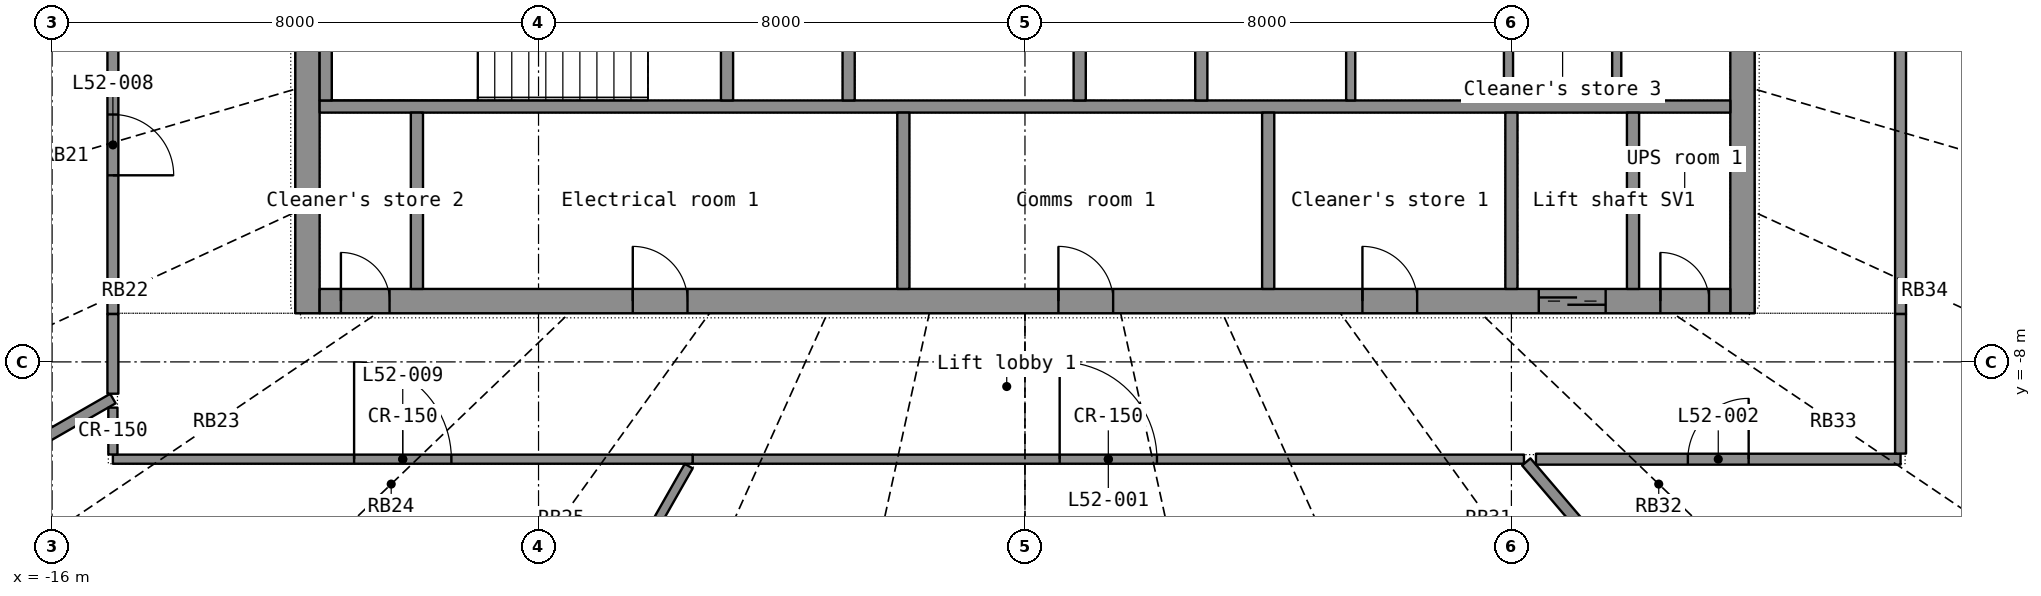
"""IFC4 building model, lengths in metres.
Left out: names, types, materials, properties, quantities, classifications, styles, units other than length and angle.
Written with IfcOpenShell. Run it as: python <this file> out.ifc"""

import sys

from ifc_helpers import new_model, si_unit, direction, frame, frame_2d, origin, place, context, subcontext, project, spatial, rectangle, extrude, element, fill, save


model = new_model("IFC4")
c1 = context("Model", 3, precision=1e-05, world=origin(), true_north=direction((0.0, 1.0)))
c2 = subcontext(c1, "Body", "Model", "MODEL_VIEW")
j1 = project(units=[si_unit("LENGTHUNIT", "METRE"), si_unit("PLANEANGLEUNIT", "RADIAN")], contexts=[c1])
p1 = place(None, origin())
s1 = spatial("IfcSite", under=j1, at=p1, CompositionType="ELEMENT")
p2 = place(p1, origin())
s2 = spatial("IfcBuilding", under=s1, at=p2, CompositionType="ELEMENT")
p3 = place(p2, frame((0.0, 0.0, 217.1)))
s3 = spatial("IfcBuildingStorey", under=s2, at=p3, CompositionType="ELEMENT", Elevation=217.1)
p4 = place(p3, frame((-11.8, -7.2, 0.0), z_axis=(0.0, 0.0, 1.0), x_axis=(0.0, 1.0, 0.0)))
e1 = element("IfcWall", 1, at=p4, inside=s3, PredefinedType="SHEAR", context=c2, shape_type="SweptSolid", body=[
    extrude(rectangle(XDim=14.4, YDim=0.4, at=frame_2d((7.2, 0.0))), origin(), (0.0, 0.0, 1.0), 3.3),
])
p5 = place(p4, frame((6.5, 0.0, 0.0)))
e2 = element("IfcOpeningElement", 2, at=p5, cuts=e1, PredefinedType="OPENING", context=c2, shape_type="SweptSolid", body=[
    extrude(rectangle(XDim=1.4, YDim=2.2, at=frame_2d((0.7, 1.1))), frame((0.0, 0.21, 0.0), z_axis=(0.0, -1.0, 0.0), x_axis=(1.0, 0.0, 0.0)), (0.0, 0.0, 1.0), 0.42),
])
p6 = place(p3, frame((11.8, -7.2, 0.0), z_axis=(0.0, 0.0, 1.0), x_axis=(0.0, 1.0, 0.0)))
e3 = element("IfcWall", 3, at=p6, inside=s3, PredefinedType="SHEAR", context=c2, shape_type="SweptSolid", body=[
    extrude(rectangle(XDim=14.4, YDim=0.4, at=frame_2d((7.2, 0.0))), origin(), (0.0, 0.0, 1.0), 3.3),
])
p7 = place(p6, frame((6.5, 0.0, 0.0)))
e4 = element("IfcOpeningElement", 4, at=p7, cuts=e3, PredefinedType="OPENING", context=c2, shape_type="SweptSolid", body=[
    extrude(rectangle(XDim=1.4, YDim=2.2, at=frame_2d((0.7, 1.1))), frame((0.0, 0.21, 0.0), z_axis=(0.0, -1.0, 0.0), x_axis=(1.0, 0.0, 0.0)), (0.0, 0.0, 1.0), 0.42),
])
p8 = place(p3, frame((-11.6, -7.0, 0.0), z_axis=(0.0, 0.0, 1.0), x_axis=(1.0, 0.0, 0.0)))
e5 = element("IfcWall", 5, at=p8, inside=s3, PredefinedType="SHEAR", context=c2, shape_type="SweptSolid", body=[
    extrude(rectangle(XDim=23.2, YDim=0.4, at=frame_2d((11.6, 0.0))), origin(), (0.0, 0.0, 1.0), 3.3),
])
p9 = place(p8, frame((20.05, 0.0, 0.0)))
e6 = element("IfcOpeningElement", 6, at=p9, cuts=e5, PredefinedType="OPENING", context=c2, shape_type="SweptSolid", body=[
    extrude(rectangle(XDim=1.1, YDim=2.2, at=frame_2d((0.55, 1.1))), frame((0.0, 0.21, 0.0), z_axis=(0.0, -1.0, 0.0), x_axis=(1.0, 0.0, 0.0)), (0.0, 0.0, 1.0), 0.42),
])
p10 = place(p8, frame((5.15, 0.0, 0.0)))
e7 = element("IfcOpeningElement", 7, at=p10, cuts=e5, PredefinedType="OPENING", context=c2, shape_type="SweptSolid", body=[
    extrude(rectangle(XDim=0.9, YDim=2.1, at=frame_2d((0.45, 1.05))), frame((0.0, 0.21, 0.0), z_axis=(0.0, -1.0, 0.0), x_axis=(1.0, 0.0, 0.0)), (0.0, 0.0, 1.0), 0.42),
])
p11 = place(p8, frame((12.15, 0.0, 0.0)))
e8 = element("IfcOpeningElement", 8, at=p11, cuts=e5, PredefinedType="OPENING", context=c2, shape_type="SweptSolid", body=[
    extrude(rectangle(XDim=0.9, YDim=2.1, at=frame_2d((0.45, 1.05))), frame((0.0, 0.21, 0.0), z_axis=(0.0, -1.0, 0.0), x_axis=(1.0, 0.0, 0.0)), (0.0, 0.0, 1.0), 0.42),
])
p12 = place(p8, frame((17.15, 0.0, 0.0)))
e9 = element("IfcOpeningElement", 9, at=p12, cuts=e5, PredefinedType="OPENING", context=c2, shape_type="SweptSolid", body=[
    extrude(rectangle(XDim=0.9, YDim=2.1, at=frame_2d((0.45, 1.05))), frame((0.0, 0.21, 0.0), z_axis=(0.0, -1.0, 0.0), x_axis=(1.0, 0.0, 0.0)), (0.0, 0.0, 1.0), 0.42),
])
p13 = place(p8, frame((0.35, 0.0, 0.0)))
e10 = element("IfcOpeningElement", 10, at=p13, cuts=e5, PredefinedType="OPENING", context=c2, shape_type="SweptSolid", body=[
    extrude(rectangle(XDim=0.8, YDim=2.05, at=frame_2d((0.4, 1.025))), frame((0.0, 0.21, 0.0), z_axis=(0.0, -1.0, 0.0), x_axis=(1.0, 0.0, 0.0)), (0.0, 0.0, 1.0), 0.42),
])
p14 = place(p8, frame((22.05, 0.0, 0.0)))
e11 = element("IfcOpeningElement", 11, at=p14, cuts=e5, PredefinedType="OPENING", context=c2, shape_type="SweptSolid", body=[
    extrude(rectangle(XDim=0.8, YDim=2.05, at=frame_2d((0.4, 1.025))), frame((0.0, 0.21, 0.0), z_axis=(0.0, -1.0, 0.0), x_axis=(1.0, 0.0, 0.0)), (0.0, 0.0, 1.0), 0.42),
])
p15 = place(p3, frame((-11.6, -3.8, 0.0), z_axis=(0.0, 0.0, 1.0), x_axis=(1.0, 0.0, 0.0)))
e12 = element("IfcWall", 12, at=p15, inside=s3, PredefinedType="SHEAR", context=c2, shape_type="SweptSolid", body=[
    extrude(rectangle(XDim=23.2, YDim=0.2, at=frame_2d((11.6, 0.0))), origin(), (0.0, 0.0, 1.0), 3.3),
])
for number, where, z_axis, x_axis in (
    (13, (-10.0, -6.8, 0.0), (0.0, 0.0, 1.0), (0.0, 1.0, 0.0)),
    (14, (8.0, -6.8, 0.0), (0.0, 0.0, 1.0), (0.0, 1.0, 0.0)),
    (15, (10.0, -6.8, 0.0), (0.0, 0.0, 1.0), (0.0, 1.0, 0.0)),
):
    element("IfcWall", number, at=place(p3, frame(where, z_axis=z_axis, x_axis=x_axis)), inside=s3, PredefinedType="SHEAR", context=c2, shape_type="SweptSolid", body=[
        extrude(rectangle(XDim=2.9, YDim=0.2, at=frame_2d((1.45, 0.0))), origin(), (0.0, 0.0, 1.0), 3.3),
    ])
for number, where, z_axis, x_axis in (
    (16, (-2.0, -6.8, 0.0), (0.0, 0.0, 1.0), (0.0, 1.0, 0.0)),
    (17, (4.0, -6.8, 0.0), (0.0, 0.0, 1.0), (0.0, 1.0, 0.0)),
):
    element("IfcWall", number, at=place(p3, frame(where, z_axis=z_axis, x_axis=x_axis)), inside=s3, PredefinedType="PARTITIONING", context=c2, shape_type="SweptSolid", body=[
        extrude(rectangle(XDim=2.9, YDim=0.2, at=frame_2d((1.45, 0.0))), origin(), (0.0, 0.0, 1.0), 3.3),
    ])
p16 = place(p3, frame((-2.9, -3.7, 0.0), z_axis=(0.0, 0.0, 1.0), x_axis=(0.0, 1.0, 0.0)))
e18 = element("IfcWall", 18, at=p16, inside=s3, PredefinedType="SHEAR", context=c2, shape_type="SweptSolid", body=[
    extrude(rectangle(XDim=7.4, YDim=0.2, at=frame_2d((3.7, 0.0))), origin(), (0.0, 0.0, 1.0), 3.3),
])
p17 = place(p16, frame((3.1, 0.0, 0.0)))
e19 = element("IfcOpeningElement", 19, at=p17, cuts=e18, PredefinedType="OPENING", context=c2, shape_type="SweptSolid", body=[
    extrude(rectangle(XDim=1.2, YDim=2.2, at=frame_2d((0.6, 1.1))), frame((0.0, 0.11, 0.0), z_axis=(0.0, -1.0, 0.0), x_axis=(1.0, 0.0, 0.0)), (0.0, 0.0, 1.0), 0.22),
])
p18 = place(p3, frame((2.9, -3.7, 0.0), z_axis=(0.0, 0.0, 1.0), x_axis=(0.0, 1.0, 0.0)))
e20 = element("IfcWall", 20, at=p18, inside=s3, PredefinedType="SHEAR", context=c2, shape_type="SweptSolid", body=[
    extrude(rectangle(XDim=7.4, YDim=0.2, at=frame_2d((3.7, 0.0))), origin(), (0.0, 0.0, 1.0), 3.3),
])
p19 = place(p18, frame((3.1, 0.0, 0.0)))
e21 = element("IfcOpeningElement", 21, at=p19, cuts=e20, PredefinedType="OPENING", context=c2, shape_type="SweptSolid", body=[
    extrude(rectangle(XDim=1.2, YDim=2.2, at=frame_2d((0.6, 1.1))), frame((0.0, 0.11, 0.0), z_axis=(0.0, -1.0, 0.0), x_axis=(1.0, 0.0, 0.0)), (0.0, 0.0, 1.0), 0.22),
])
for number, where, z_axis, x_axis in (
    (22, (0.9, -3.7, 0.0), (0.0, 0.0, 1.0), (0.0, 1.0, 0.0)),
    (23, (-11.5, -3.7, 0.0), (0.0, 0.0, 1.0), (0.0, 1.0, 0.0)),
    (24, (-4.9, -3.7, 0.0), (0.0, 0.0, 1.0), (0.0, 1.0, 0.0)),
):
    element("IfcWall", number, at=place(p3, frame(where, z_axis=z_axis, x_axis=x_axis)), inside=s3, PredefinedType="SHEAR", context=c2, shape_type="SweptSolid", body=[
        extrude(rectangle(XDim=2.35, YDim=0.2, at=frame_2d((1.175, 0.0))), origin(), (0.0, 0.0, 1.0), 3.3),
    ])
for number, where, z_axis, x_axis in (
    (25, (5.357, -3.7, 0.0), (0.0, 0.0, 1.0), (0.0, 1.0, 0.0)),
    (26, (7.952, -3.7, 0.0), (0.0, 0.0, 1.0), (0.0, 1.0, 0.0)),
    (27, (9.732, -3.7, 0.0), (0.0, 0.0, 1.0), (0.0, 1.0, 0.0)),
):
    element("IfcWall", number, at=place(p3, frame(where, z_axis=z_axis, x_axis=x_axis)), inside=s3, PredefinedType="PARTITIONING", context=c2, shape_type="SweptSolid", body=[
        extrude(rectangle(XDim=2.35, YDim=0.15, at=frame_2d((1.175, 0.0))), origin(), (0.0, 0.0, 1.0), 3.3),
    ])
p20 = place(p3, frame((-5.465, -9.6, 0.0), z_axis=(0.0, 0.0, 1.0), x_axis=(1.0, 0.0, 0.0)))
e28 = element("IfcWall", 28, at=p20, inside=s3, PredefinedType="PARTITIONING", context=c2, shape_type="SweptSolid", body=[
    extrude(rectangle(XDim=13.671, YDim=0.15, at=frame_2d((6.836, 0.0))), origin(), (0.0, 0.0, 1.0), 2.4),
])
p21 = place(p20, frame((6.036, 0.0, 0.0)))
e29 = element("IfcOpeningElement", 29, at=p21, cuts=e28, PredefinedType="OPENING", context=c2, shape_type="SweptSolid", body=[
    extrude(rectangle(XDim=1.6, YDim=2.4, at=frame_2d((0.8, 1.2))), frame((0.0, 0.085, 0.0), z_axis=(0.0, -1.0, 0.0), x_axis=(1.0, 0.0, 0.0)), (0.0, 0.0, 1.0), 0.17),
])
p22 = place(p3, frame((-15.0, -9.6, 0.0), z_axis=(0.0, 0.0, 1.0), x_axis=(1.0, 0.0, 0.0)))
e30 = element("IfcWall", 30, at=p22, inside=s3, PredefinedType="PARTITIONING", context=c2, shape_type="SweptSolid", body=[
    extrude(rectangle(XDim=9.534, YDim=0.15, at=frame_2d((4.767, 0.0))), origin(), (0.0, 0.0, 1.0), 2.4),
])
p23 = place(p22, frame((3.967, 0.0, 0.0)))
e31 = element("IfcOpeningElement", 31, at=p23, cuts=e30, PredefinedType="OPENING", context=c2, shape_type="SweptSolid", body=[
    extrude(rectangle(XDim=1.6, YDim=2.4, at=frame_2d((0.8, 1.2))), frame((0.0, 0.085, 0.0), z_axis=(0.0, -1.0, 0.0), x_axis=(1.0, 0.0, 0.0)), (0.0, 0.0, 1.0), 0.17),
])
p24 = place(p3, frame((-5.53, -9.714, 0.0), z_axis=(0.0, 0.0, 1.0), x_axis=(-0.494747754, -0.869036628, 0.0)))
e32 = element("IfcWall", 32, at=p24, inside=s3, PredefinedType="PARTITIONING", context=c2, shape_type="SweptSolid", body=[
    extrude(rectangle(XDim=7.355, YDim=0.15, at=frame_2d((3.677, 0.0))), origin(), (0.0, 0.0, 1.0), 2.4),
])
p25 = place(p3, frame((12.446, -14.56, 0.0), z_axis=(0.0, 0.0, 1.0), x_axis=(-0.649761442, 0.76013819, 0.0)))
e33 = element("IfcWall", 33, at=p25, inside=s3, PredefinedType="PARTITIONING", context=c2, shape_type="SweptSolid", body=[
    extrude(rectangle(XDim=6.465, YDim=0.18, at=frame_2d((3.233, 0.0))), origin(), (0.0, 0.0, 1.0), 2.4),
])
p26 = place(p3, frame((8.404, -9.6, 0.0), z_axis=(0.0, 0.0, 1.0), x_axis=(1.0, 0.0, 0.0)))
e34 = element("IfcWall", 34, at=p26, inside=s3, PredefinedType="PARTITIONING", context=c2, shape_type="SweptSolid", body=[
    extrude(rectangle(XDim=5.996, YDim=0.18, at=frame_2d((2.998, 0.0))), origin(), (0.0, 0.0, 1.0), 2.4),
])
p27 = place(p26, frame((2.498, 0.0, 0.0)))
e35 = element("IfcOpeningElement", 35, at=p27, cuts=e34, PredefinedType="OPENING", context=c2, shape_type="SweptSolid", body=[
    extrude(rectangle(XDim=1.0, YDim=2.1, at=frame_2d((0.5, 1.05))), frame((0.0, 0.1, 0.0), z_axis=(0.0, -1.0, 0.0), x_axis=(1.0, 0.0, 0.0)), (0.0, 0.0, 1.0), 0.2),
])
p28 = place(p3, frame((-15.0, -1.65, 0.0), z_axis=(0.0, 0.0, 1.0), x_axis=(0.0, -1.0, 0.0)))
e36 = element("IfcWall", 36, at=p28, inside=s3, PredefinedType="PARTITIONING", context=c2, shape_type="SweptSolid", body=[
    extrude(rectangle(XDim=5.562, YDim=0.18, at=frame_2d((2.781, 0.0))), origin(), (0.0, 0.0, 1.0), 2.4),
])
p29 = place(p28, frame((2.281, 0.0, 0.0)))
e37 = element("IfcOpeningElement", 37, at=p29, cuts=e36, PredefinedType="OPENING", context=c2, shape_type="SweptSolid", body=[
    extrude(rectangle(XDim=1.0, YDim=2.1, at=frame_2d((0.5, 1.05))), frame((0.0, 0.1, 0.0), z_axis=(0.0, -1.0, 0.0), x_axis=(1.0, 0.0, 0.0)), (0.0, 0.0, 1.0), 0.2),
])
p30 = place(p3, frame((14.4, -7.212, 0.0), z_axis=(0.0, 0.0, 1.0), x_axis=(0.0, 1.0, 0.0)))
e38 = element("IfcWall", 38, at=p30, inside=s3, PredefinedType="PARTITIONING", context=c2, shape_type="SweptSolid", body=[
    extrude(rectangle(XDim=5.562, YDim=0.18, at=frame_2d((2.781, 0.0))), origin(), (0.0, 0.0, 1.0), 2.4),
])
p31 = place(p3, frame((-17.78, -10.198, 0.0), z_axis=(0.0, 0.0, 1.0), x_axis=(0.867435755, 0.497549205, 0.0)))
e39 = element("IfcWall", 39, at=p31, inside=s3, PredefinedType="PARTITIONING", context=c2, shape_type="SweptSolid", body=[
    extrude(rectangle(XDim=3.205, YDim=0.18, at=frame_2d((1.603, 0.0))), origin(), (0.0, 0.0, 1.0), 2.4),
])
p32 = place(p3, frame((14.4, -9.508, 0.0), z_axis=(0.0, 0.0, 1.0), x_axis=(0.0, 1.0, 0.0)))
e40 = element("IfcWall", 40, at=p32, inside=s3, PredefinedType="PARTITIONING", context=c2, shape_type="SweptSolid", body=[
    extrude(rectangle(XDim=2.295, YDim=0.18, at=frame_2d((1.147, 0.0))), origin(), (0.0, 0.0, 1.0), 2.4),
])
p33 = place(p3, frame((-15.0, -7.213, 0.0), z_axis=(0.0, 0.0, 1.0), x_axis=(0.0, -1.0, 0.0)))
e41 = element("IfcWall", 41, at=p33, inside=s3, PredefinedType="PARTITIONING", context=c2, shape_type="SweptSolid", body=[
    extrude(rectangle(XDim=1.31, YDim=0.18, at=frame_2d((0.655, 0.0))), origin(), (0.0, 0.0, 1.0), 2.4),
])
p34 = place(p3, frame((-15.0, -8.752, 0.0), z_axis=(0.0, 0.0, 1.0), x_axis=(0.0, -1.0, 0.0)))
e42 = element("IfcWall", 42, at=p34, inside=s3, PredefinedType="PARTITIONING", context=c2, shape_type="SweptSolid", body=[
    extrude(rectangle(XDim=0.771, YDim=0.15, at=frame_2d((0.385, 0.0))), origin(), (0.0, 0.0, 1.0), 2.4),
])
p35 = place(p9, origin())
e43 = element("IfcDoor", 43, at=p35, inside=s3, OperationType="DOUBLE_DOOR_SLIDING", PredefinedType="DOOR", context=c2, shape_type="SweptSolid", body=[
    extrude(rectangle(XDim=1.1, YDim=2.2, at=frame_2d((0.55, 1.1))), frame((0.0, 0.025, 0.0), z_axis=(0.0, -1.0, 0.0), x_axis=(1.0, 0.0, 0.0)), (0.0, 0.0, 1.0), 0.05),
])
fill(e6, e43)
p36 = place(p10, origin())
e44 = element("IfcDoor", 44, at=p36, inside=s3, OperationType="SINGLE_SWING_LEFT", PredefinedType="DOOR", context=c2, shape_type="SweptSolid", body=[
    extrude(rectangle(XDim=0.9, YDim=2.1, at=frame_2d((0.45, 1.05))), frame((0.0, 0.025, 0.0), z_axis=(0.0, -1.0, 0.0), x_axis=(1.0, 0.0, 0.0)), (0.0, 0.0, 1.0), 0.05),
])
fill(e7, e44)
p37 = place(p11, origin())
e45 = element("IfcDoor", 45, at=p37, inside=s3, OperationType="SINGLE_SWING_LEFT", PredefinedType="DOOR", context=c2, shape_type="SweptSolid", body=[
    extrude(rectangle(XDim=0.9, YDim=2.1, at=frame_2d((0.45, 1.05))), frame((0.0, 0.025, 0.0), z_axis=(0.0, -1.0, 0.0), x_axis=(1.0, 0.0, 0.0)), (0.0, 0.0, 1.0), 0.05),
])
fill(e8, e45)
p38 = place(p12, origin())
e46 = element("IfcDoor", 46, at=p38, inside=s3, OperationType="SINGLE_SWING_LEFT", PredefinedType="DOOR", context=c2, shape_type="SweptSolid", body=[
    extrude(rectangle(XDim=0.9, YDim=2.1, at=frame_2d((0.45, 1.05))), frame((0.0, 0.025, 0.0), z_axis=(0.0, -1.0, 0.0), x_axis=(1.0, 0.0, 0.0)), (0.0, 0.0, 1.0), 0.05),
])
fill(e9, e46)
p39 = place(p13, origin())
e47 = element("IfcDoor", 47, at=p39, inside=s3, OperationType="SINGLE_SWING_LEFT", PredefinedType="DOOR", context=c2, shape_type="SweptSolid", body=[
    extrude(rectangle(XDim=0.8, YDim=2.05, at=frame_2d((0.4, 1.025))), frame((0.0, 0.025, 0.0), z_axis=(0.0, -1.0, 0.0), x_axis=(1.0, 0.0, 0.0)), (0.0, 0.0, 1.0), 0.05),
])
fill(e10, e47)
p40 = place(p14, origin())
e48 = element("IfcDoor", 48, at=p40, inside=s3, OperationType="SINGLE_SWING_LEFT", PredefinedType="DOOR", context=c2, shape_type="SweptSolid", body=[
    extrude(rectangle(XDim=0.8, YDim=2.05, at=frame_2d((0.4, 1.025))), frame((0.0, 0.025, 0.0), z_axis=(0.0, -1.0, 0.0), x_axis=(1.0, 0.0, 0.0)), (0.0, 0.0, 1.0), 0.05),
])
fill(e11, e48)
p41 = place(p21, origin())
e49 = element("IfcDoor", 49, at=p41, inside=s3, OperationType="DOUBLE_DOOR_SINGLE_SWING", PredefinedType="DOOR", context=c2, shape_type="SweptSolid", body=[
    extrude(rectangle(XDim=1.6, YDim=2.4, at=frame_2d((0.8, 1.2))), frame((0.0, 0.025, 0.0), z_axis=(0.0, -1.0, 0.0), x_axis=(1.0, 0.0, 0.0)), (0.0, 0.0, 1.0), 0.05),
])
fill(e29, e49)
p42 = place(p27, origin())
e50 = element("IfcDoor", 50, at=p42, inside=s3, OperationType="SINGLE_SWING_RIGHT", PredefinedType="DOOR", context=c2, shape_type="SweptSolid", body=[
    extrude(rectangle(XDim=1.0, YDim=2.1, at=frame_2d((0.5, 1.05))), frame((0.0, 0.025, 0.0), z_axis=(0.0, -1.0, 0.0), x_axis=(1.0, 0.0, 0.0)), (0.0, 0.0, 1.0), 0.05),
])
fill(e35, e50)
p43 = place(p29, origin())
e51 = element("IfcDoor", 51, at=p43, inside=s3, OperationType="SINGLE_SWING_RIGHT", PredefinedType="DOOR", context=c2, shape_type="SweptSolid", body=[
    extrude(rectangle(XDim=1.0, YDim=2.1, at=frame_2d((0.5, 1.05))), frame((0.0, 0.025, 0.0), z_axis=(0.0, -1.0, 0.0), x_axis=(1.0, 0.0, 0.0)), (0.0, 0.0, 1.0), 0.05),
])
fill(e37, e51)
p44 = place(p23, origin())
e52 = element("IfcDoor", 52, at=p44, inside=s3, OperationType="DOUBLE_DOOR_SINGLE_SWING", PredefinedType="DOOR", context=c2, shape_type="SweptSolid", body=[
    extrude(rectangle(XDim=1.6, YDim=2.4, at=frame_2d((0.8, 1.2))), frame((0.0, 0.025, 0.0), z_axis=(0.0, -1.0, 0.0), x_axis=(1.0, 0.0, 0.0)), (0.0, 0.0, 1.0), 0.05),
])
fill(e31, e52)
save(model, sys.argv[1])
